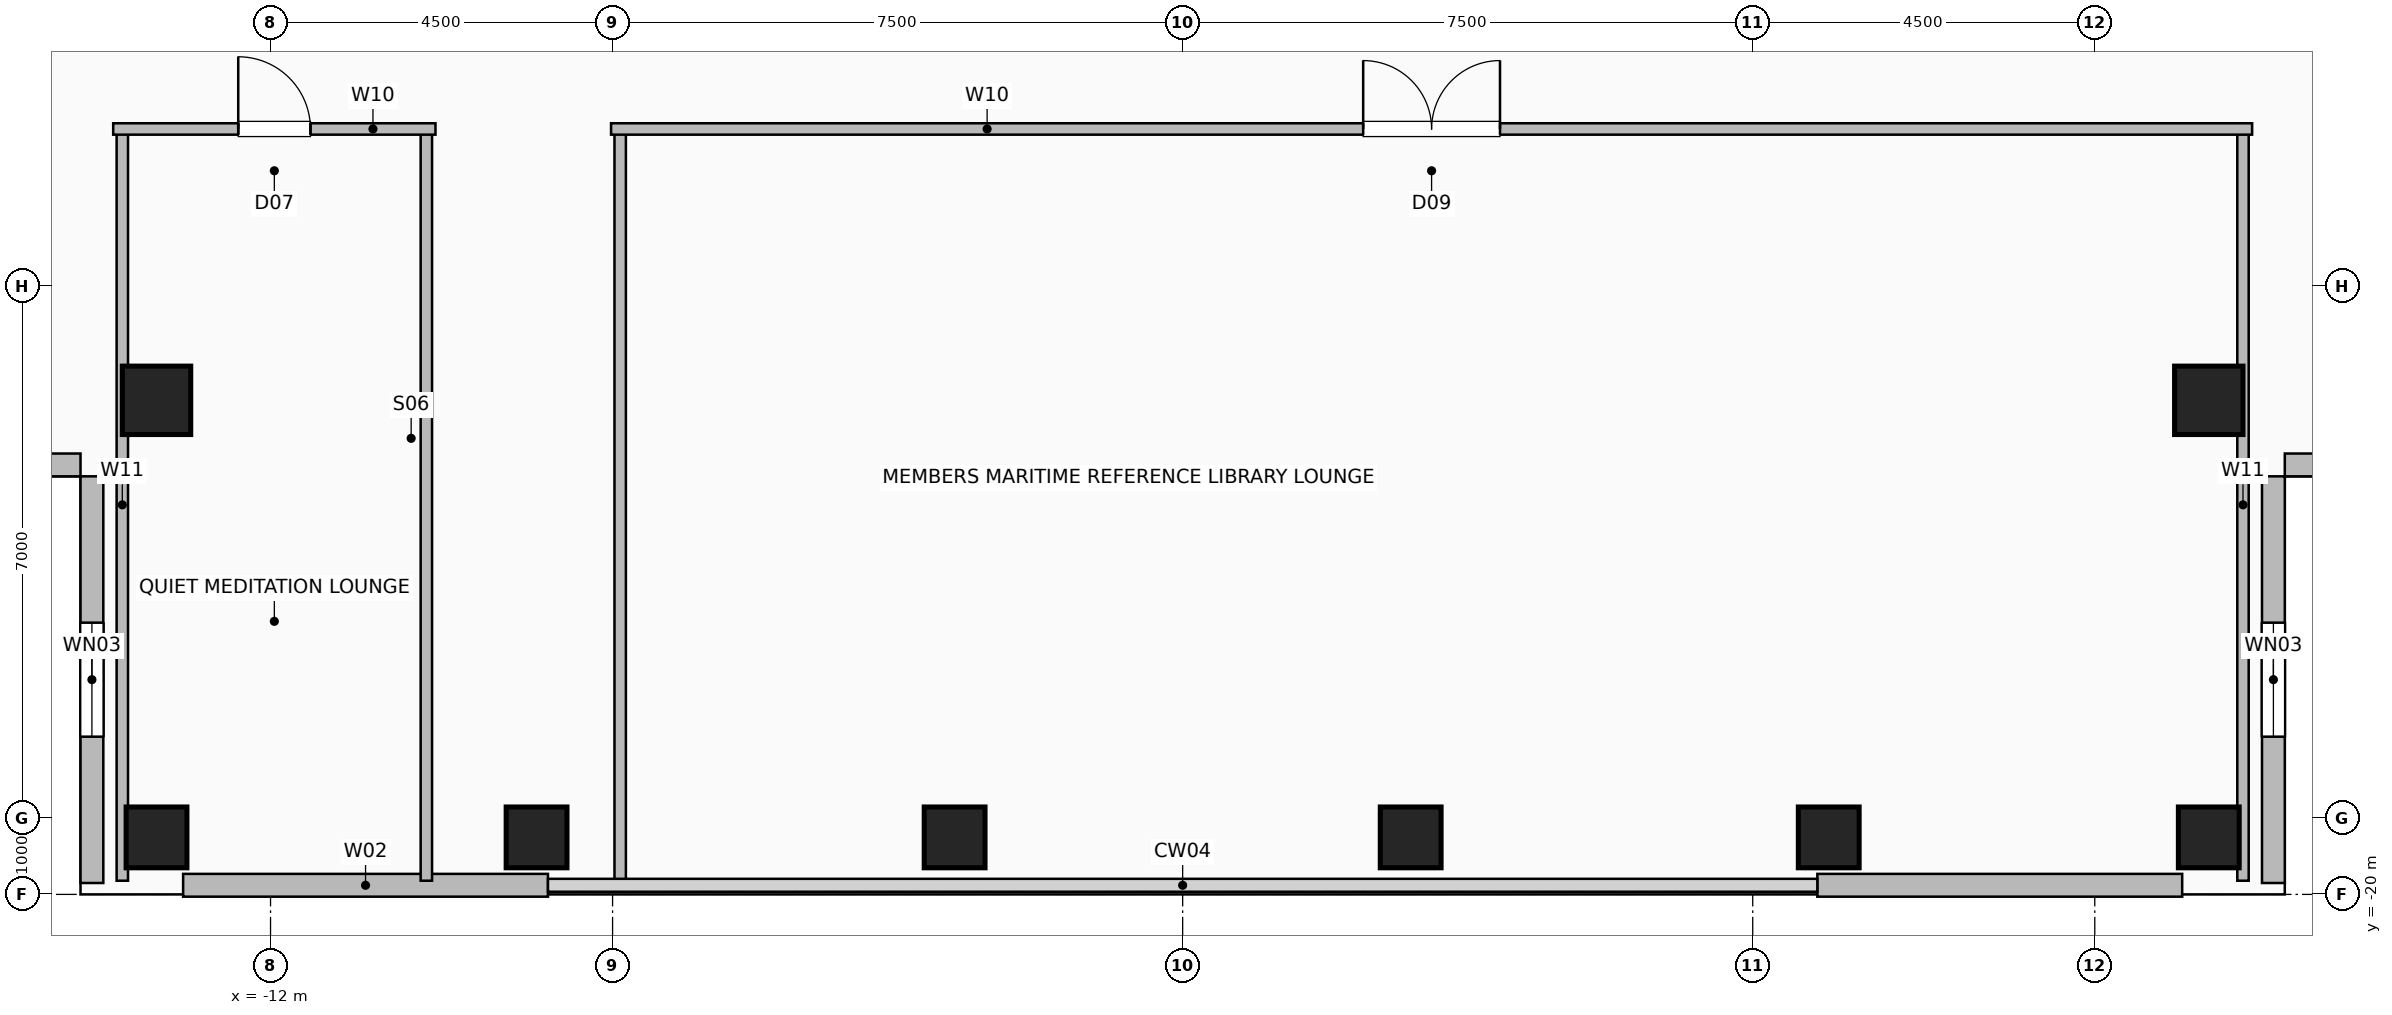
"""IFC4 building model, lengths in metres.
Left out: names, types, materials, properties, quantities, classifications, styles, units other than length and angle.
Written with IfcOpenShell. Run it as: python <this file> out.ifc"""

import sys

from ifc_helpers import new_model, si_unit, direction, frame, frame_2d, origin, origin_2d, place, context, subcontext, project, spatial, rectangle, hollow_rectangle, extrude, element, fill, save


model = new_model("IFC4")
c1 = context("Model", 3, precision=1e-05, world=origin(), true_north=direction((0.0, 1.0)))
c2 = subcontext(c1, "Body", "Model", "MODEL_VIEW")
j1 = project(units=[si_unit("LENGTHUNIT", "METRE"), si_unit("PLANEANGLEUNIT", "RADIAN")], contexts=[c1])
p1 = place(None, origin())
s1 = spatial("IfcSite", under=j1, at=p1, CompositionType="ELEMENT")
p2 = place(p1, origin())
s2 = spatial("IfcBuilding", under=s1, at=p2, CompositionType="ELEMENT")
p3 = place(p2, frame((0.0, 0.0, 202.2)))
s3 = spatial("IfcBuildingStorey", under=s2, at=p3, CompositionType="ELEMENT", Elevation=202.2)
for number, where, z_axis, x_axis in (
    (1, (-13.5, -19.25, 0.0), (0.0, 0.0, 1.0), (1.0, 0.0, 0.0)),
    (2, (-8.5, -19.25, 0.0), (0.0, 0.0, 1.0), (1.0, 0.0, 0.0)),
    (3, (-3.0, -19.25, 0.0), (0.0, 0.0, 1.0), (1.0, 0.0, 0.0)),
    (4, (3.0, -19.25, 0.0), (0.0, 0.0, 1.0), (1.0, 0.0, 0.0)),
    (5, (8.5, -19.25, 0.0), (0.0, 0.0, 1.0), (1.0, 0.0, 0.0)),
    (6, (13.5, -19.25, 0.0), (0.0, 0.0, 1.0), (1.0, 0.0, 0.0)),
):
    element("IfcColumn", number, at=place(p3, frame(where, z_axis=z_axis, x_axis=x_axis)), inside=s3, PredefinedType="COLUMN", context=c2, shape_type="SweptSolid", body=[
        extrude(hollow_rectangle(XDim=0.8, YDim=0.8, WallThickness=0.04, at=origin_2d()), origin(), (0.0, 0.0, 1.0), 3.6),
    ])
for number, where, z_axis, x_axis in (
    (7, (-13.5, -13.5, 0.0), (0.0, 0.0, 1.0), (1.0, 0.0, 0.0)),
    (8, (13.5, -13.5, 0.0), (0.0, 0.0, 1.0), (1.0, 0.0, 0.0)),
):
    element("IfcColumn", number, at=place(p3, frame(where, z_axis=z_axis, x_axis=x_axis)), inside=s3, PredefinedType="COLUMN", context=c2, shape_type="SweptSolid", body=[
        extrude(hollow_rectangle(XDim=0.9, YDim=0.9, WallThickness=0.045, at=origin_2d()), origin(), (0.0, 0.0, 1.0), 3.6),
    ])
for number, where, z_axis, x_axis in (
    (9, (-13.15, -19.88, 0.0), (0.0, 0.0, 1.0), (1.0, 0.0, 0.0)),
    (10, (8.35, -19.88, 0.0), (0.0, 0.0, 1.0), (1.0, 0.0, 0.0)),
):
    element("IfcWall", number, at=place(p3, frame(where, z_axis=z_axis, x_axis=x_axis)), inside=s3, PredefinedType="SOLIDWALL", context=c2, shape_type="SweptSolid", body=[
        extrude(rectangle(XDim=4.8, YDim=0.3, at=frame_2d((2.4, 0.0))), origin(), (0.0, 0.0, 1.0), 3.36),
    ])
p4 = place(p3, frame((-14.35, -19.85, 0.0), z_axis=(0.0, 0.0, 1.0), x_axis=(0.0, 1.0, 0.0)))
e11 = element("IfcWall", 11, at=p4, inside=s3, PredefinedType="SOLIDWALL", context=c2, shape_type="SweptSolid", body=[
    extrude(rectangle(XDim=5.35, YDim=0.3, at=frame_2d((2.675, 0.0))), origin(), (0.0, 0.0, 1.0), 3.36),
])
p5 = place(p4, frame((1.925, 0.0, 0.9)))
e12 = element("IfcOpeningElement", 12, at=p5, cuts=e11, PredefinedType="OPENING", context=c2, shape_type="SweptSolid", body=[
    extrude(rectangle(XDim=1.5, YDim=1.8, at=frame_2d((0.75, 0.9))), frame((0.0, 0.16, 0.0), z_axis=(0.0, -1.0, 0.0), x_axis=(1.0, 0.0, 0.0)), (0.0, 0.0, 1.0), 0.32),
])
p6 = place(p3, frame((-19.85, -14.35, 0.0), z_axis=(0.0, 0.0, 1.0), x_axis=(1.0, 0.0, 0.0)))
e13 = element("IfcWall", 13, at=p6, inside=s3, PredefinedType="SOLIDWALL", context=c2, shape_type="SweptSolid", body=[
    extrude(rectangle(XDim=5.35, YDim=0.3, at=frame_2d((2.675, 0.0))), origin(), (0.0, 0.0, 1.0), 3.36),
])
p7 = place(p3, frame((14.35, -19.85, 0.0), z_axis=(0.0, 0.0, 1.0), x_axis=(0.0, 1.0, 0.0)))
e14 = element("IfcWall", 14, at=p7, inside=s3, PredefinedType="SOLIDWALL", context=c2, shape_type="SweptSolid", body=[
    extrude(rectangle(XDim=5.35, YDim=0.3, at=frame_2d((2.675, 0.0))), origin(), (0.0, 0.0, 1.0), 3.36),
])
p8 = place(p7, frame((1.925, 0.0, 0.9)))
e15 = element("IfcOpeningElement", 15, at=p8, cuts=e14, PredefinedType="OPENING", context=c2, shape_type="SweptSolid", body=[
    extrude(rectangle(XDim=1.5, YDim=1.8, at=frame_2d((0.75, 0.9))), frame((0.0, 0.16, 0.0), z_axis=(0.0, -1.0, 0.0), x_axis=(1.0, 0.0, 0.0)), (0.0, 0.0, 1.0), 0.32),
])
p9 = place(p3, frame((19.85, -14.35, 0.0), z_axis=(0.0, 0.0, 1.0), x_axis=(-1.0, 0.0, 0.0)))
e16 = element("IfcWall", 16, at=p9, inside=s3, PredefinedType="SOLIDWALL", context=c2, shape_type="SweptSolid", body=[
    extrude(rectangle(XDim=5.35, YDim=0.3, at=frame_2d((2.675, 0.0))), origin(), (0.0, 0.0, 1.0), 3.36),
])
for number, where, z_axis, x_axis in (
    (17, (-13.95, -19.82, 0.0), (0.0, 0.0, 1.0), (0.0, 1.0, 0.0)),
    (18, (-9.95, -19.82, 0.0), (0.0, 0.0, 1.0), (0.0, 1.0, 0.0)),
):
    element("IfcWall", number, at=place(p3, frame(where, z_axis=z_axis, x_axis=x_axis)), inside=s3, PredefinedType="PARTITIONING", context=c2, shape_type="SweptSolid", body=[
        extrude(rectangle(XDim=9.89, YDim=0.15, at=frame_2d((4.945, 0.0))), origin(), (0.0, 0.0, 1.0), 3.36),
    ])
p10 = place(p3, frame((-14.07, -9.93, 0.0), z_axis=(0.0, 0.0, 1.0), x_axis=(1.0, 0.0, 0.0)))
e19 = element("IfcWall", 19, at=p10, inside=s3, PredefinedType="PARTITIONING", context=c2, shape_type="SweptSolid", body=[
    extrude(rectangle(XDim=4.24, YDim=0.15, at=frame_2d((2.12, 0.0))), origin(), (0.0, 0.0, 1.0), 3.36),
])
p11 = place(p10, frame((1.645, 0.0, 0.0)))
e20 = element("IfcOpeningElement", 20, at=p11, cuts=e19, PredefinedType="OPENING", context=c2, shape_type="SweptSolid", body=[
    extrude(rectangle(XDim=0.95, YDim=2.06, at=frame_2d((0.475, 1.03))), frame((0.0, 0.085, 0.0), z_axis=(0.0, -1.0, 0.0), x_axis=(1.0, 0.0, 0.0)), (0.0, 0.0, 1.0), 0.17),
])
for number, where, z_axis, x_axis in (
    (21, (-7.4, -19.82, 0.0), (0.0, 0.0, 1.0), (0.0, 1.0, 0.0)),
    (22, (13.95, -19.82, 0.0), (0.0, 0.0, 1.0), (0.0, 1.0, 0.0)),
):
    element("IfcWall", number, at=place(p3, frame(where, z_axis=z_axis, x_axis=x_axis)), inside=s3, PredefinedType="PARTITIONING", context=c2, shape_type="SweptSolid", body=[
        extrude(rectangle(XDim=9.89, YDim=0.15, at=frame_2d((4.945, 0.0))), origin(), (0.0, 0.0, 1.0), 3.36),
    ])
p12 = place(p3, frame((-7.52, -9.93, 0.0), z_axis=(0.0, 0.0, 1.0), x_axis=(1.0, 0.0, 0.0)))
e23 = element("IfcWall", 23, at=p12, inside=s3, PredefinedType="PARTITIONING", context=c2, shape_type="SweptSolid", body=[
    extrude(rectangle(XDim=21.59, YDim=0.15, at=frame_2d((10.795, 0.0))), origin(), (0.0, 0.0, 1.0), 3.36),
])
p13 = place(p12, frame((9.895, 0.0, 0.0)))
e24 = element("IfcOpeningElement", 24, at=p13, cuts=e23, PredefinedType="OPENING", context=c2, shape_type="SweptSolid", body=[
    extrude(rectangle(XDim=1.8, YDim=2.08, at=frame_2d((0.9, 1.04))), frame((0.0, 0.085, 0.0), z_axis=(0.0, -1.0, 0.0), x_axis=(1.0, 0.0, 0.0)), (0.0, 0.0, 1.0), 0.17),
])
p14 = place(p5, origin())
e25 = element("IfcWindow", 25, at=p14, inside=s3, PartitioningType="SINGLE_PANEL", PredefinedType="WINDOW", context=c2, shape_type="SweptSolid", body=[
    extrude(rectangle(XDim=1.5, YDim=1.8, at=frame_2d((0.75, 0.9))), frame((0.0, 0.03, 0.0), z_axis=(0.0, -1.0, 0.0), x_axis=(1.0, 0.0, 0.0)), (0.0, 0.0, 1.0), 0.06),
])
fill(e12, e25)
p15 = place(p8, origin())
e26 = element("IfcWindow", 26, at=p15, inside=s3, PartitioningType="SINGLE_PANEL", PredefinedType="WINDOW", context=c2, shape_type="SweptSolid", body=[
    extrude(rectangle(XDim=1.5, YDim=1.8, at=frame_2d((0.75, 0.9))), frame((0.0, 0.03, 0.0), z_axis=(0.0, -1.0, 0.0), x_axis=(1.0, 0.0, 0.0)), (0.0, 0.0, 1.0), 0.06),
])
fill(e15, e26)
p16 = place(p11, origin())
e27 = element("IfcDoor", 27, at=p16, inside=s3, OperationType="SINGLE_SWING_LEFT", PredefinedType="DOOR", context=c2, shape_type="SweptSolid", body=[
    extrude(rectangle(XDim=0.95, YDim=2.06, at=frame_2d((0.475, 1.03))), frame((0.0, 0.025, 0.0), z_axis=(0.0, -1.0, 0.0), x_axis=(1.0, 0.0, 0.0)), (0.0, 0.0, 1.0), 0.05),
])
fill(e20, e27)
p17 = place(p13, origin())
e28 = element("IfcDoor", 28, at=p17, inside=s3, OperationType="DOUBLE_DOOR_SINGLE_SWING", PredefinedType="DOOR", context=c2, shape_type="SweptSolid", body=[
    extrude(rectangle(XDim=1.8, YDim=2.08, at=frame_2d((0.9, 1.04))), frame((0.0, 0.025, 0.0), z_axis=(0.0, -1.0, 0.0), x_axis=(1.0, 0.0, 0.0)), (0.0, 0.0, 1.0), 0.05),
])
fill(e24, e28)
save(model, sys.argv[1])
